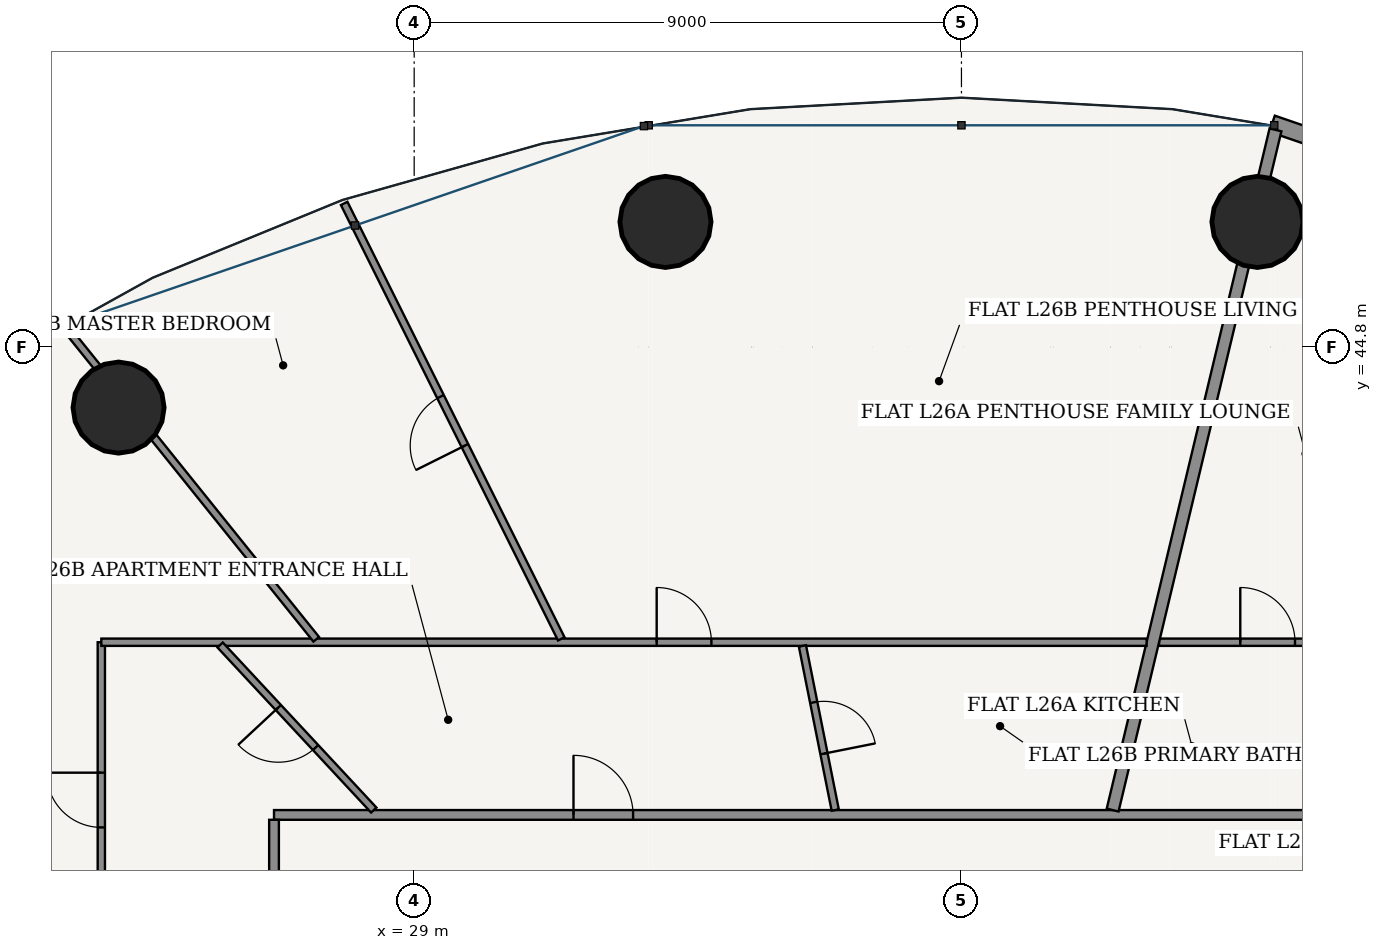
"""IFC4 building model, lengths in metres.
Left out: names, types, materials, properties, quantities, classifications, styles, units other than length and angle.
Written with IfcOpenShell. Run it as: python <this file> out.ifc"""

import sys

from ifc_helpers import new_model, si_unit, direction, frame, frame_2d, origin, origin_2d, place, context, subcontext, project, spatial, rectangle, hollow_circle, extrude, source, transform, mapped, element, fill, save


model = new_model("IFC4")
c1 = context("Model", 3, precision=1e-05, world=origin(), true_north=direction((-0.2419218956, 0.970295726276)))
c2 = subcontext(c1, "Body", "Model", "MODEL_VIEW")
j1 = project(units=[si_unit("LENGTHUNIT", "METRE"), si_unit("PLANEANGLEUNIT", "RADIAN")], contexts=[c1])
p1 = place(None, origin())
s1 = spatial("IfcSite", under=j1, at=p1, CompositionType="ELEMENT")
p2 = place(p1, origin())
s2 = spatial("IfcBuilding", under=s1, at=p2, CompositionType="ELEMENT")
p3 = place(p2, frame((0.0, 0.0, 101.4)))
s3 = spatial("IfcBuildingStorey", under=s2, at=p3, CompositionType="ELEMENT", Elevation=101.4)
for number, where, z_axis, x_axis in (
    (1, (42.867, 46.857, 0.0), (0.0, 0.0, 1.0), (1.0, 0.0, 0.0)),
    (2, (33.133, 46.857, 0.0), (0.0, 0.0, 1.0), (1.0, 0.0, 0.0)),
    (3, (24.138, 43.803, 0.0), (0.0, 0.0, 1.0), (1.0, 0.0, 0.0)),
):
    element("IfcColumn", number, at=place(p3, frame(where, z_axis=z_axis, x_axis=x_axis)), inside=s3, PredefinedType="COLUMN", context=c2, shape_type="SweptSolid", body=[
        extrude(hollow_circle(Radius=0.75, WallThickness=0.045, at=origin_2d()), origin(), (0.0, 0.0, 1.0), 3.6),
    ])
p4 = place(p3, frame((52.837, 45.125, 0.0), z_axis=(0.0, 0.0, 1.0), x_axis=(-0.945597432299, 0.325339047809, 0.0)))
e4 = element("IfcWall", 4, at=p4, inside=s3, PredefinedType="SOLIDWALL", context=c2, shape_type="SweptSolid", body=[
    extrude(rectangle(XDim=10.289, YDim=0.28, at=frame_2d((5.145, 0.0))), origin(), (0.0, 0.0, 1.0), 3.325),
])
p5 = place(p4, frame((1.728, 0.0, 0.85)))
e5 = element("IfcOpeningElement", 5, at=p5, cuts=e4, PredefinedType="OPENING", context=c2, shape_type="SweptSolid", body=[
    extrude(rectangle(XDim=2.1, YDim=1.95, at=frame_2d((1.05, 0.975))), frame((0.0, 0.15, 0.0), z_axis=(0.0, -1.0, 0.0), x_axis=(1.0, 0.0, 0.0)), (0.0, 0.0, 1.0), 0.3),
])
p6 = place(p4, frame((6.461, 0.0, 0.85)))
e6 = element("IfcOpeningElement", 6, at=p6, cuts=e4, PredefinedType="OPENING", context=c2, shape_type="SweptSolid", body=[
    extrude(rectangle(XDim=2.1, YDim=1.95, at=frame_2d((1.05, 0.975))), frame((0.0, 0.15, 0.0), z_axis=(0.0, -1.0, 0.0), x_axis=(1.0, 0.0, 0.0)), (0.0, 0.0, 1.0), 0.3),
])
p7 = place(p3, frame((26.695, 37.105, 0.0), z_axis=(0.0, 0.0, 1.0), x_axis=(1.0, 0.0, 0.0)))
e7 = element("IfcWall", 7, at=p7, inside=s3, PredefinedType="PARTITIONING", context=c2, shape_type="SweptSolid", body=[
    extrude(rectangle(XDim=22.61, YDim=0.16, at=frame_2d((11.305, 0.0))), origin(), (0.0, 0.0, 1.0), 2.767),
])
p8 = place(p7, frame((4.925, 0.0, 0.0)))
e8 = element("IfcOpeningElement", 8, at=p8, cuts=e7, PredefinedType="OPENING", context=c2, shape_type="SweptSolid", body=[
    extrude(rectangle(XDim=0.98, YDim=2.2, at=frame_2d((0.49, 1.1))), frame((0.0, 0.09, 0.0), z_axis=(0.0, -1.0, 0.0), x_axis=(1.0, 0.0, 0.0)), (0.0, 0.0, 1.0), 0.18),
])
p9 = place(p3, frame((26.695, 16.575, 0.0), z_axis=(0.0, 0.0, 1.0), x_axis=(0.0, 1.0, 0.0)))
e9 = element("IfcWall", 9, at=p9, inside=s3, PredefinedType="PARTITIONING", context=c2, shape_type="SweptSolid", body=[
    extrude(rectangle(XDim=20.45, YDim=0.16, at=frame_2d((10.225, 0.0))), origin(), (0.0, 0.0, 1.0), 2.767),
])
p10 = place(p9, frame((9.547, 0.0, 0.0)))
e10 = element("IfcOpeningElement", 10, at=p10, cuts=e9, PredefinedType="OPENING", context=c2, shape_type="SweptSolid", body=[
    extrude(rectangle(XDim=0.98, YDim=2.2, at=frame_2d((0.49, 1.1))), frame((0.0, 0.09, 0.0), z_axis=(0.0, -1.0, 0.0), x_axis=(1.0, 0.0, 0.0)), (0.0, 0.0, 1.0), 0.18),
])
p11 = place(p3, frame((41.249, 39.945, 0.0), z_axis=(0.0, 0.0, 1.0), x_axis=(1.0, 0.0, 0.0)))
e11 = element("IfcWall", 11, at=p11, inside=s3, PredefinedType="PARTITIONING", context=c2, shape_type="SweptSolid", body=[
    extrude(rectangle(XDim=10.896, YDim=0.12, at=frame_2d((5.448, 0.0))), origin(), (0.0, 0.0, 1.0), 2.767),
])
p12 = place(p11, frame((1.336, 0.0, 0.0)))
e12 = element("IfcOpeningElement", 12, at=p12, cuts=e11, PredefinedType="OPENING", context=c2, shape_type="SweptSolid", body=[
    extrude(rectangle(XDim=0.9, YDim=2.15, at=frame_2d((0.45, 1.075))), frame((0.0, 0.07, 0.0), z_axis=(0.0, -1.0, 0.0), x_axis=(1.0, 0.0, 0.0)), (0.0, 0.0, 1.0), 0.14),
])
p13 = place(p3, frame((40.486, 37.185, 0.0), z_axis=(0.0, 0.0, 1.0), x_axis=(0.232834224261, 0.972516438942, 0.0)))
e13 = element("IfcWall", 13, at=p13, inside=s3, PredefinedType="PARTITIONING", context=c2, shape_type="SweptSolid", body=[
    extrude(rectangle(XDim=11.502, YDim=0.2, at=frame_2d((5.751, 0.0))), origin(), (0.0, 0.0, 1.0), 2.767),
])
p14 = place(p3, frame((23.855, 34.754, 0.0), z_axis=(0.0, 0.0, 1.0), x_axis=(0.0, 1.0, 0.0)))
e14 = element("IfcWall", 14, at=p14, inside=s3, PredefinedType="PARTITIONING", context=c2, shape_type="SweptSolid", body=[
    extrude(rectangle(XDim=5.191, YDim=0.12, at=frame_2d((2.595, 0.0))), origin(), (0.0, 0.0, 1.0), 3.004),
])
p15 = place(p14, frame((2.145, 0.0, 0.0)))
e15 = element("IfcOpeningElement", 15, at=p15, cuts=e14, PredefinedType="OPENING", context=c2, shape_type="SweptSolid", body=[
    extrude(rectangle(XDim=0.9, YDim=2.15, at=frame_2d((0.45, 1.075))), frame((0.0, 0.07, 0.0), z_axis=(0.0, -1.0, 0.0), x_axis=(1.0, 0.0, 0.0)), (0.0, 0.0, 1.0), 0.14),
])
p16 = place(p3, frame((23.855, 39.945, 0.0), z_axis=(0.0, 0.0, 1.0), x_axis=(1.0, 0.0, 0.0)))
e16 = element("IfcWall", 16, at=p16, inside=s3, PredefinedType="PARTITIONING", context=c2, shape_type="SweptSolid", body=[
    extrude(rectangle(XDim=17.19, YDim=0.12, at=frame_2d((8.595, 0.0))), origin(), (0.0, 0.0, 1.0), 2.767),
])
p17 = place(p16, frame((9.133, 0.0, 0.0)))
e17 = element("IfcOpeningElement", 17, at=p17, cuts=e16, PredefinedType="OPENING", context=c2, shape_type="SweptSolid", body=[
    extrude(rectangle(XDim=0.9, YDim=2.15, at=frame_2d((0.45, 1.075))), frame((0.0, 0.07, 0.0), z_axis=(0.0, -1.0, 0.0), x_axis=(1.0, 0.0, 0.0)), (0.0, 0.0, 1.0), 0.14),
])
p18 = place(p3, frame((31.419, 40.0, 0.0), z_axis=(0.0, 0.0, 1.0), x_axis=(-0.446188142997, 0.894939182877, 0.0)))
e18 = element("IfcWall", 18, at=p18, inside=s3, PredefinedType="PARTITIONING", context=c2, shape_type="SweptSolid", body=[
    extrude(rectangle(XDim=8.002, YDim=0.12, at=frame_2d((4.001, 0.0))), origin(), (0.0, 0.0, 1.0), 2.767),
])
p19 = place(p18, frame((3.551, 0.0, 0.0)))
e19 = element("IfcOpeningElement", 19, at=p19, cuts=e18, PredefinedType="OPENING", context=c2, shape_type="SweptSolid", body=[
    extrude(rectangle(XDim=0.9, YDim=2.15, at=frame_2d((0.45, 1.075))), frame((0.0, 0.07, 0.0), z_axis=(0.0, -1.0, 0.0), x_axis=(1.0, 0.0, 0.0)), (0.0, 0.0, 1.0), 0.14),
])
p20 = place(p3, frame((27.389, 39.993, 0.0), z_axis=(0.0, 0.0, 1.0), x_axis=(-0.626719700294, 0.779244773651, 0.0)))
e20 = element("IfcWall", 20, at=p20, inside=s3, PredefinedType="PARTITIONING", context=c2, shape_type="SweptSolid", body=[
    extrude(rectangle(XDim=6.537, YDim=0.12, at=frame_2d((3.269, 0.0))), origin(), (0.0, 0.0, 1.0), 2.767),
])
p21 = place(p3, frame((35.925, 37.185, 0.0), z_axis=(0.0, 0.0, 1.0), x_axis=(-0.196013794811, 0.980601138202, 0.0)))
e21 = element("IfcWall", 21, at=p21, inside=s3, PredefinedType="PARTITIONING", context=c2, shape_type="SweptSolid", body=[
    extrude(rectangle(XDim=2.753, YDim=0.12, at=frame_2d((1.376, 0.0))), origin(), (0.0, 0.0, 1.0), 3.325),
])
p22 = place(p21, frame((0.946, 0.0, 0.0)))
e22 = element("IfcOpeningElement", 22, at=p22, cuts=e21, PredefinedType="OPENING", context=c2, shape_type="SweptSolid", body=[
    extrude(rectangle(XDim=0.86, YDim=2.15, at=frame_2d((0.43, 1.075))), frame((0.0, 0.07, 0.0), z_axis=(0.0, -1.0, 0.0), x_axis=(1.0, 0.0, 0.0)), (0.0, 0.0, 1.0), 0.14),
])
p23 = place(p3, frame((28.335, 37.185, 0.0), z_axis=(0.0, 0.0, 1.0), x_axis=(-0.681236086606, 0.732063791145, 0.0)))
e23 = element("IfcWall", 23, at=p23, inside=s3, PredefinedType="PARTITIONING", context=c2, shape_type="SweptSolid", body=[
    extrude(rectangle(XDim=3.708, YDim=0.12, at=frame_2d((1.854, 0.0))), origin(), (0.0, 0.0, 1.0), 2.767),
])
p24 = place(p23, frame((1.404, 0.0, 0.0)))
e24 = element("IfcOpeningElement", 24, at=p24, cuts=e23, PredefinedType="OPENING", context=c2, shape_type="SweptSolid", body=[
    extrude(rectangle(XDim=0.9, YDim=2.15, at=frame_2d((0.45, 1.075))), frame((0.0, 0.07, 0.0), z_axis=(0.0, -1.0, 0.0), x_axis=(1.0, 0.0, 0.0)), (0.0, 0.0, 1.0), 0.14),
])
p25 = place(p3, frame((26.615, 33.12, 0.0), z_axis=(0.0, 0.0, 1.0), x_axis=(-0.874319192772, 0.485351366692, 0.0)))
e25 = element("IfcWall", 25, at=p25, inside=s3, PredefinedType="PARTITIONING", context=c2, shape_type="SweptSolid", body=[
    extrude(rectangle(XDim=12.158, YDim=0.2, at=frame_2d((6.079, 0.0))), origin(), (0.0, 0.0, 1.0), 2.767),
])
m1 = source(origin(), c2, "Body", "SweptSolid", [
    extrude(rectangle(XDim=0.9, YDim=2.15, at=frame_2d((0.45, 1.075))), frame((0.0, 0.025, 0.0), z_axis=(0.0, -1.0, 0.0), x_axis=(1.0, 0.0, 0.0)), (0.0, 0.0, 1.0), 0.05),
])
p26 = place(p12, origin())
e26 = element("IfcDoor", 26, at=p26, inside=s3, OperationType="SINGLE_SWING_LEFT", PredefinedType="DOOR", context=c2, shape_type="MappedRepresentation", body=[
    mapped(m1, transform((0.0, 0.0, 0.0), scale=1.0)),
])
fill(e12, e26)
m2 = source(origin(), c2, "Body", "SweptSolid", [
    extrude(rectangle(XDim=0.98, YDim=2.2, at=frame_2d((0.49, 1.1))), frame((0.0, 0.025, 0.0), z_axis=(0.0, -1.0, 0.0), x_axis=(1.0, 0.0, 0.0)), (0.0, 0.0, 1.0), 0.05),
])
p27 = place(p8, origin())
e27 = element("IfcDoor", 27, at=p27, inside=s3, OperationType="SINGLE_SWING_LEFT", PredefinedType="DOOR", context=c2, shape_type="MappedRepresentation", body=[
    mapped(m2, transform((0.0, 0.0, 0.0), scale=1.0)),
])
fill(e8, e27)
m3 = source(origin(), c2, "Body", "SweptSolid", [
    extrude(rectangle(XDim=0.86, YDim=2.15, at=frame_2d((0.43, 1.075))), frame((0.0, 0.025, 0.0), z_axis=(0.0, -1.0, 0.0), x_axis=(1.0, 0.0, 0.0)), (0.0, 0.0, 1.0), 0.05),
])
p28 = place(p22, frame((0.86, 0.0, 0.0), z_axis=(0.0, 0.0, 1.0), x_axis=(-1.0, 0.0, 0.0)))
e28 = element("IfcDoor", 28, at=p28, inside=s3, OperationType="SINGLE_SWING_RIGHT", PredefinedType="DOOR", context=c2, shape_type="MappedRepresentation", body=[
    mapped(m3, transform((0.0, 0.0, 0.0), scale=1.0)),
])
fill(e22, e28)
p29 = place(p17, origin())
e29 = element("IfcDoor", 29, at=p29, inside=s3, OperationType="SINGLE_SWING_LEFT", PredefinedType="DOOR", context=c2, shape_type="MappedRepresentation", body=[
    mapped(m1, transform((0.0, 0.0, 0.0), scale=1.0)),
])
fill(e17, e29)
p30 = place(p24, origin())
e30 = element("IfcDoor", 30, at=p30, inside=s3, OperationType="SINGLE_SWING_RIGHT", PredefinedType="DOOR", context=c2, shape_type="MappedRepresentation", body=[
    mapped(m1, transform((0.0, 0.0, 0.0), scale=1.0)),
])
fill(e24, e30)
p31 = place(p19, origin())
e31 = element("IfcDoor", 31, at=p31, inside=s3, OperationType="SINGLE_SWING_LEFT", PredefinedType="DOOR", context=c2, shape_type="MappedRepresentation", body=[
    mapped(m1, transform((0.0, 0.0, 0.0), scale=1.0)),
])
fill(e19, e31)
p32 = place(p15, origin())
e32 = element("IfcDoor", 32, at=p32, inside=s3, OperationType="SINGLE_SWING_RIGHT", PredefinedType="DOOR", context=c2, shape_type="MappedRepresentation", body=[
    mapped(m1, transform((0.0, 0.0, 0.0), scale=1.0)),
])
fill(e15, e32)
save(model, sys.argv[1])
